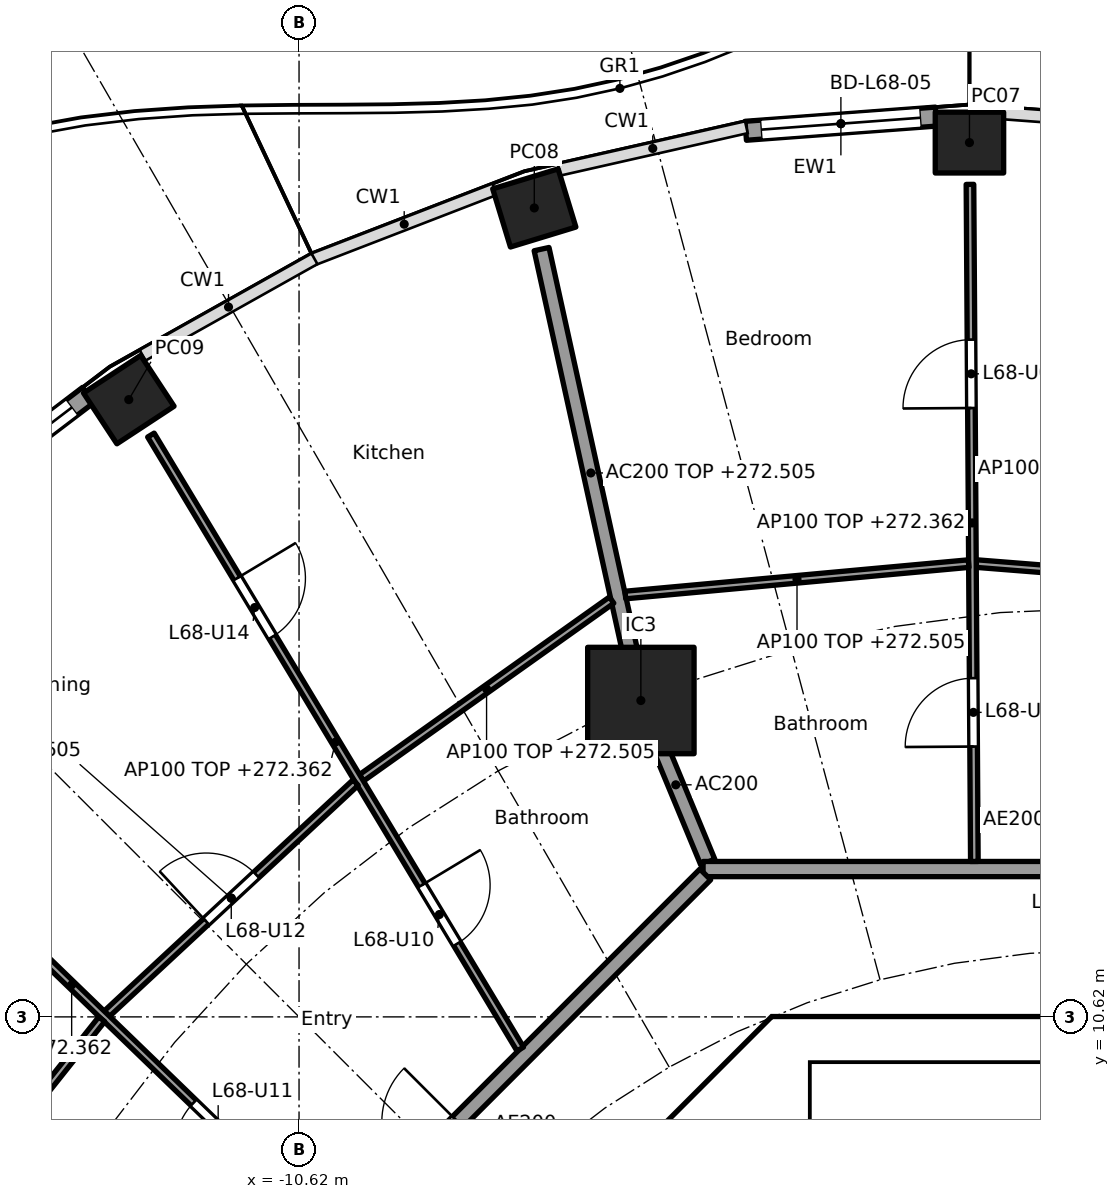
"""IFC4 building model, lengths in metres.
Left out: names, types, materials, properties, quantities, classifications, styles, units other than length and angle.
Written with IfcOpenShell. Run it as: python <this file> out.ifc"""

import sys

from ifc_helpers import new_model, si_unit, direction, frame, frame_2d, origin, origin_2d, place, context, subcontext, project, spatial, polyline, rectangle, hollow_rectangle, outline, extrude, element, fill, save


model = new_model("IFC4")
c1 = context("Model", 3, precision=1e-05, world=origin(), true_north=direction((0.0, 1.0)))
c2 = subcontext(c1, "Body", "Model", "MODEL_VIEW")
j1 = project(units=[si_unit("LENGTHUNIT", "METRE"), si_unit("PLANEANGLEUNIT", "RADIAN")], contexts=[c1])
p1 = place(None, origin())
s1 = spatial("IfcSite", under=j1, at=p1, CompositionType="ELEMENT")
p2 = place(p1, origin())
s2 = spatial("IfcBuilding", under=s1, at=p2, CompositionType="ELEMENT")
p3 = place(p2, frame((0.0, 0.0, 269.6)))
s3 = spatial("IfcBuildingStorey", under=s2, at=p3, CompositionType="ELEMENT", Elevation=269.6)
for number, where, z_axis, x_axis in (
    (1, (-1.8, 22.122, 0.0), (0.0, 0.0, 1.0), (-1.0, 0.0, 0.0)),
    (2, (-7.525, 21.262, 0.0), (0.0, 0.0, 1.0), (-0.957, -0.292, 0.0)),
    (3, (-12.86, 18.741, 0.0), (0.0, 0.0, 1.0), (-0.836, -0.549, 0.0)),
):
    element("IfcColumn", number, at=place(p3, frame(where, z_axis=z_axis, x_axis=x_axis)), inside=s3, PredefinedType="COLUMN", context=c2, shape_type="SweptSolid", body=[
        extrude(hollow_rectangle(XDim=0.9, YDim=0.8, WallThickness=0.028, at=origin_2d()), origin(), (0.0, 0.0, 1.0), 3.7),
    ])
p4 = place(p3, frame((-6.123, 14.782, 0.0), z_axis=(0.0, 0.0, 1.0), x_axis=(1.0, 0.0, 0.0)))
e4 = element("IfcColumn", 4, at=p4, inside=s3, PredefinedType="COLUMN", context=c2, shape_type="SweptSolid", body=[
    extrude(rectangle(XDim=1.4, YDim=1.4, at=origin_2d()), origin(), (0.0, 0.0, 1.0), 3.7),
])
p5 = place(p3, frame((-4.743, 22.277, 0.0), z_axis=(0.0, 0.0, 1.0), x_axis=(0.99722914645, 0.074391057731, 0.0)))
e5 = element("IfcWall", 5, at=p5, inside=s3, PredefinedType="SOLIDWALL", context=c2, shape_type="SweptSolid", body=[
    extrude(rectangle(XDim=2.51, YDim=0.25, at=frame_2d((1.255, 0.0))), origin(), (0.0, 0.0, 1.0), 3.44),
])
p6 = place(p5, frame((0.205, 0.0, 0.0)))
e6 = element("IfcOpeningElement", 6, at=p6, cuts=e5, PredefinedType="OPENING", context=c2, shape_type="SweptSolid", body=[
    extrude(rectangle(XDim=2.1, YDim=2.4, at=frame_2d((1.05, 1.2))), frame((0.0, 0.135, 0.0), z_axis=(0.0, -1.0, 0.0), x_axis=(1.0, 0.0, 0.0)), (0.0, 0.0, 1.0), 0.27),
])
p7 = place(p3, frame((-15.495, 17.204, 0.0), z_axis=(0.0, 0.0, 1.0), x_axis=(0.796010739377, 0.605282498339, 0.0)))
e7 = element("IfcWall", 7, at=p7, inside=s3, PredefinedType="SOLIDWALL", context=c2, shape_type="SweptSolid", body=[
    extrude(rectangle(XDim=2.641, YDim=0.25, at=frame_2d((1.32, 0.0))), origin(), (0.0, 0.0, 1.0), 3.44),
])
p8 = place(p7, frame((0.27, 0.0, 0.0)))
e8 = element("IfcOpeningElement", 8, at=p8, cuts=e7, PredefinedType="OPENING", context=c2, shape_type="SweptSolid", body=[
    extrude(rectangle(XDim=2.1, YDim=2.4, at=frame_2d((1.05, 1.2))), frame((0.0, 0.135, 0.0), z_axis=(0.0, -1.0, 0.0), x_axis=(1.0, 0.0, 0.0)), (0.0, 0.0, 1.0), 0.27),
])
p9 = place(p3, frame((-4.613, 9.988, 0.0), z_axis=(0.0, 0.0, 1.0), x_axis=(-0.707106781187, -0.707106781187, 0.0)))
e9 = element("IfcWall", 9, at=p9, inside=s3, PredefinedType="SHEAR", context=c2, shape_type="SweptSolid", body=[
    extrude(rectangle(XDim=7.602, YDim=0.6, at=frame_2d((3.801, 0.0))), origin(), (0.0, 0.0, 1.0), 3.44),
])
p10 = place(p9, frame((0.351, 0.0, 0.0)))
e10 = element("IfcOpeningElement", 10, at=p10, cuts=e9, PredefinedType="OPENING", context=c2, shape_type="SweptSolid", body=[
    extrude(rectangle(XDim=1.1, YDim=2.1, at=frame_2d((0.55, 1.05))), frame((0.0, 0.31, 0.0), z_axis=(0.0, -1.0, 0.0), x_axis=(1.0, 0.0, 0.0)), (0.0, 0.0, 1.0), 0.62),
])
p11 = place(p3, origin())
e11 = element("IfcWall", 11, at=p11, inside=s3, PredefinedType="SHEAR", context=c2, shape_type="SweptSolid", body=[
    extrude(outline(polyline([(-4.152, 10.025), (-4.401, 9.776), (-4.825, 10.2), (-4.401, 10.625), (4.401, 10.625), (4.825, 10.2), (4.401, 9.776), (4.152, 10.025), (-4.152, 10.025)])), origin(), (0.0, 0.0, 1.0), 3.44),
])
p12 = place(p3, origin())
e12 = element("IfcWall", 12, at=p12, inside=s3, PredefinedType="SOLIDWALL", context=c2, shape_type="SweptSolid", body=[
    extrude(outline(polyline([(-3.9, 7.025), (-4.1, 7.025), (-4.1, 10.025), (-3.9, 10.025), (-3.9, 7.025)])), origin(), (0.0, 0.0, 1.0), 3.44),
])
p13 = place(p3, frame((-5.243, 12.657, 0.0), z_axis=(0.0, 0.0, 1.0), x_axis=(-0.38273085373, 0.923859888513, 0.0)))
e13 = element("IfcWall", 13, at=p13, inside=s3, PredefinedType="PARTITIONING", context=c2, shape_type="SweptSolid", body=[
    extrude(rectangle(XDim=2.199, YDim=0.2, at=frame_2d((1.1, 0.0))), origin(), (0.0, 0.0, 1.0), 3.44),
])
p14 = place(p3, frame((-6.134, 14.831, 0.0), z_axis=(0.0, 0.0, 1.0), x_axis=(-0.214842475666, 0.976648714047, 0.0)))
e14 = element("IfcWall", 14, at=p14, inside=s3, PredefinedType="PARTITIONING", context=c2, shape_type="SweptSolid", body=[
    extrude(rectangle(XDim=6.031, YDim=0.2, at=frame_2d((3.015, 0.0))), origin(), (0.0, 0.0, 1.0), 2.905),
])
p15 = place(p3, frame((5.104, 12.565, 0.0), z_axis=(0.0, 0.0, 1.0), x_axis=(-1.0, 0.0, 0.0)))
e15 = element("IfcWall", 15, at=p15, inside=s3, PredefinedType="PARTITIONING", context=c2, shape_type="SweptSolid", body=[
    extrude(rectangle(XDim=10.409, YDim=0.2, at=frame_2d((5.205, 0.0))), origin(), (0.0, 0.0, 1.0), 3.44),
])
p16 = place(p15, frame((4.604, 0.0, 0.0)))
e16 = element("IfcOpeningElement", 16, at=p16, cuts=e15, PredefinedType="OPENING", context=c2, shape_type="SweptSolid", body=[
    extrude(rectangle(XDim=1.0, YDim=2.1, at=frame_2d((0.5, 1.05))), frame((0.0, 0.11, 0.0), z_axis=(0.0, -1.0, 0.0), x_axis=(1.0, 0.0, 0.0)), (0.0, 0.0, 1.0), 0.22),
])
p17 = place(p3, frame((-5.275, 12.494, 0.0), z_axis=(0.0, 0.0, 1.0), x_axis=(-0.707106781187, -0.707106781187, 0.0)))
e17 = element("IfcWall", 17, at=p17, inside=s3, PredefinedType="PARTITIONING", context=c2, shape_type="SweptSolid", body=[
    extrude(rectangle(XDim=10.209, YDim=0.2, at=frame_2d((5.104, 0.0))), origin(), (0.0, 0.0, 1.0), 3.44),
])
p18 = place(p17, frame((4.604, 0.0, 0.0)))
e18 = element("IfcOpeningElement", 18, at=p18, cuts=e17, PredefinedType="OPENING", context=c2, shape_type="SweptSolid", body=[
    extrude(rectangle(XDim=1.0, YDim=2.1, at=frame_2d((0.5, 1.05))), frame((0.0, 0.11, 0.0), z_axis=(0.0, -1.0, 0.0), x_axis=(1.0, 0.0, 0.0)), (0.0, 0.0, 1.0), 0.22),
])
p19 = place(p3, frame((2.713, 16.233, 0.0), z_axis=(0.0, 0.0, 1.0), x_axis=(-0.996870142942, 0.079056423588, 0.0)))
e19 = element("IfcWall", 19, at=p19, inside=s3, PredefinedType="PARTITIONING", context=c2, shape_type="SweptSolid", body=[
    extrude(rectangle(XDim=4.438, YDim=0.1, at=frame_2d((2.219, 0.0))), origin(), (0.0, 0.0, 1.0), 2.905),
])
p20 = place(p19, frame((1.794, 0.0, 0.0)))
e20 = element("IfcOpeningElement", 20, at=p20, cuts=e19, PredefinedType="OPENING", context=c2, shape_type="SweptSolid", body=[
    extrude(rectangle(XDim=0.9, YDim=2.1, at=frame_2d((0.45, 1.05))), frame((0.0, 0.06, 0.0), z_axis=(0.0, -1.0, 0.0), x_axis=(1.0, 0.0, 0.0)), (0.0, 0.0, 1.0), 0.12),
])
p21 = place(p3, frame((-1.736, 12.665, 0.0), z_axis=(0.0, 0.0, 1.0), x_axis=(-0.00646827636, 0.999979080482, 0.0)))
e21 = element("IfcWall", 21, at=p21, inside=s3, PredefinedType="PARTITIONING", context=c2, shape_type="SweptSolid", body=[
    extrude(rectangle(XDim=8.908, YDim=0.1, at=frame_2d((4.454, 0.0))), origin(), (0.0, 0.0, 1.0), 2.762),
])
p22 = place(p21, frame((1.512, 0.0, 0.0)))
e22 = element("IfcOpeningElement", 22, at=p22, cuts=e21, PredefinedType="OPENING", context=c2, shape_type="SweptSolid", body=[
    extrude(rectangle(XDim=0.9, YDim=2.1, at=frame_2d((0.45, 1.05))), frame((0.0, 0.06, 0.0), z_axis=(0.0, -1.0, 0.0), x_axis=(1.0, 0.0, 0.0)), (0.0, 0.0, 1.0), 0.12),
])
p23 = place(p21, frame((5.965, 0.0, 0.0)))
e23 = element("IfcOpeningElement", 23, at=p23, cuts=e21, PredefinedType="OPENING", context=c2, shape_type="SweptSolid", body=[
    extrude(rectangle(XDim=0.9, YDim=2.1, at=frame_2d((0.45, 1.05))), frame((0.0, 0.06, 0.0), z_axis=(0.0, -1.0, 0.0), x_axis=(1.0, 0.0, 0.0)), (0.0, 0.0, 1.0), 0.12),
])
p24 = place(p3, frame((-1.811, 16.583, 0.0), z_axis=(0.0, 0.0, 1.0), x_axis=(-0.995842301034, -0.091093970555, 0.0)))
e24 = element("IfcWall", 24, at=p24, inside=s3, PredefinedType="PARTITIONING", context=c2, shape_type="SweptSolid", body=[
    extrude(rectangle(XDim=4.535, YDim=0.1, at=frame_2d((2.267, 0.0))), origin(), (0.0, 0.0, 1.0), 2.905),
])
p25 = place(p3, frame((-6.508, 16.103, 0.0), z_axis=(0.0, 0.0, 1.0), x_axis=(-0.815202203556, -0.579176456114, 0.0)))
e25 = element("IfcWall", 25, at=p25, inside=s3, PredefinedType="PARTITIONING", context=c2, shape_type="SweptSolid", body=[
    extrude(rectangle(XDim=4.036, YDim=0.1, at=frame_2d((2.018, 0.0))), origin(), (0.0, 0.0, 1.0), 2.905),
])
p26 = place(p3, frame((-7.709, 10.197, 0.0), z_axis=(0.0, 0.0, 1.0), x_axis=(-0.515516160663, 0.856879856278, 0.0)))
e26 = element("IfcWall", 26, at=p26, inside=s3, PredefinedType="PARTITIONING", context=c2, shape_type="SweptSolid", body=[
    extrude(rectangle(XDim=9.426, YDim=0.1, at=frame_2d((4.713, 0.0))), origin(), (0.0, 0.0, 1.0), 2.762),
])
p27 = place(p26, frame((1.615, 0.0, 0.0)))
e27 = element("IfcOpeningElement", 27, at=p27, cuts=e26, PredefinedType="OPENING", context=c2, shape_type="SweptSolid", body=[
    extrude(rectangle(XDim=0.9, YDim=2.1, at=frame_2d((0.45, 1.05))), frame((0.0, 0.06, 0.0), z_axis=(0.0, -1.0, 0.0), x_axis=(1.0, 0.0, 0.0)), (0.0, 0.0, 1.0), 0.12),
])
p28 = place(p26, frame((6.328, 0.0, 0.0)))
e28 = element("IfcOpeningElement", 28, at=p28, cuts=e26, PredefinedType="OPENING", context=c2, shape_type="SweptSolid", body=[
    extrude(rectangle(XDim=0.9, YDim=2.1, at=frame_2d((0.45, 1.05))), frame((0.0, 0.06, 0.0), z_axis=(0.0, -1.0, 0.0), x_axis=(1.0, 0.0, 0.0)), (0.0, 0.0, 1.0), 0.12),
])
p29 = place(p3, frame((-9.875, 13.702, 0.0), z_axis=(0.0, 0.0, 1.0), x_axis=(-0.732618266441, -0.680639754699, 0.0)))
e29 = element("IfcWall", 29, at=p29, inside=s3, PredefinedType="PARTITIONING", context=c2, shape_type="SweptSolid", body=[
    extrude(rectangle(XDim=4.467, YDim=0.1, at=frame_2d((2.233, 0.0))), origin(), (0.0, 0.0, 1.0), 2.905),
])
p30 = place(p29, frame((1.783, 0.0, 0.0)))
e30 = element("IfcOpeningElement", 30, at=p30, cuts=e29, PredefinedType="OPENING", context=c2, shape_type="SweptSolid", body=[
    extrude(rectangle(XDim=0.9, YDim=2.1, at=frame_2d((0.45, 1.05))), frame((0.0, 0.06, 0.0), z_axis=(0.0, -1.0, 0.0), x_axis=(1.0, 0.0, 0.0)), (0.0, 0.0, 1.0), 0.12),
])
p31 = place(p3, frame((-10.183, 7.727, 0.0), z_axis=(0.0, 0.0, 1.0), x_axis=(-0.719063433856, 0.694944442449, 0.0)))
e31 = element("IfcWall", 31, at=p31, inside=s3, PredefinedType="PARTITIONING", context=c2, shape_type="SweptSolid", body=[
    extrude(rectangle(XDim=9.535, YDim=0.1, at=frame_2d((4.768, 0.0))), origin(), (0.0, 0.0, 1.0), 2.762),
])
p32 = place(p31, frame((1.637, 0.0, 0.0)))
e32 = element("IfcOpeningElement", 32, at=p32, cuts=e31, PredefinedType="OPENING", context=c2, shape_type="SweptSolid", body=[
    extrude(rectangle(XDim=0.9, YDim=2.1, at=frame_2d((0.45, 1.05))), frame((0.0, 0.06, 0.0), z_axis=(0.0, -1.0, 0.0), x_axis=(1.0, 0.0, 0.0)), (0.0, 0.0, 1.0), 0.12),
])
p33 = place(p31, frame((6.405, 0.0, 0.0)))
e33 = element("IfcOpeningElement", 33, at=p33, cuts=e31, PredefinedType="OPENING", context=c2, shape_type="SweptSolid", body=[
    extrude(rectangle(XDim=0.9, YDim=2.1, at=frame_2d((0.45, 1.05))), frame((0.0, 0.06, 0.0), z_axis=(0.0, -1.0, 0.0), x_axis=(1.0, 0.0, 0.0)), (0.0, 0.0, 1.0), 0.12),
])
p34 = place(p3, frame((-13.216, 10.589, 0.0), z_axis=(0.0, 0.0, 1.0), x_axis=(-0.622251572882, -0.782817335045, 0.0)))
e34 = element("IfcWall", 34, at=p34, inside=s3, PredefinedType="PARTITIONING", context=c2, shape_type="SweptSolid", body=[
    extrude(rectangle(XDim=4.636, YDim=0.1, at=frame_2d((2.318, 0.0))), origin(), (0.0, 0.0, 1.0), 2.905),
])
p35 = place(p6, origin())
e35 = element("IfcDoor", 35, at=p35, inside=s3, OperationType="SLIDING_TO_LEFT", PredefinedType="DOOR", context=c2, shape_type="SweptSolid", body=[
    extrude(rectangle(XDim=2.1, YDim=2.4, at=frame_2d((1.05, 1.2))), frame((0.0, 0.025, 0.0), z_axis=(0.0, -1.0, 0.0), x_axis=(1.0, 0.0, 0.0)), (0.0, 0.0, 1.0), 0.05),
])
fill(e6, e35)
p36 = place(p8, origin())
e36 = element("IfcDoor", 36, at=p36, inside=s3, OperationType="SLIDING_TO_LEFT", PredefinedType="DOOR", context=c2, shape_type="SweptSolid", body=[
    extrude(rectangle(XDim=2.1, YDim=2.4, at=frame_2d((1.05, 1.2))), frame((0.0, 0.025, 0.0), z_axis=(0.0, -1.0, 0.0), x_axis=(1.0, 0.0, 0.0)), (0.0, 0.0, 1.0), 0.05),
])
fill(e8, e36)
p37 = place(p10, origin())
e37 = element("IfcDoor", 37, at=p37, inside=s3, OperationType="SINGLE_SWING_RIGHT", PredefinedType="DOOR", context=c2, shape_type="SweptSolid", body=[
    extrude(rectangle(XDim=1.1, YDim=2.1, at=frame_2d((0.55, 1.05))), frame((0.0, 0.025, 0.0), z_axis=(0.0, -1.0, 0.0), x_axis=(1.0, 0.0, 0.0)), (0.0, 0.0, 1.0), 0.05),
])
fill(e10, e37)
p38 = place(p22, origin())
e38 = element("IfcDoor", 38, at=p38, inside=s3, OperationType="SINGLE_SWING_LEFT", PredefinedType="DOOR", context=c2, shape_type="SweptSolid", body=[
    extrude(rectangle(XDim=0.9, YDim=2.1, at=frame_2d((0.45, 1.05))), frame((0.0, 0.025, 0.0), z_axis=(0.0, -1.0, 0.0), x_axis=(1.0, 0.0, 0.0)), (0.0, 0.0, 1.0), 0.05),
])
fill(e22, e38)
p39 = place(p23, origin())
e39 = element("IfcDoor", 39, at=p39, inside=s3, OperationType="SINGLE_SWING_LEFT", PredefinedType="DOOR", context=c2, shape_type="SweptSolid", body=[
    extrude(rectangle(XDim=0.9, YDim=2.1, at=frame_2d((0.45, 1.05))), frame((0.0, 0.025, 0.0), z_axis=(0.0, -1.0, 0.0), x_axis=(1.0, 0.0, 0.0)), (0.0, 0.0, 1.0), 0.05),
])
fill(e23, e39)
p40 = place(p27, frame((0.9, 0.0, 0.0), x_axis=(-1.0, 0.0, 0.0)))
e40 = element("IfcDoor", 40, at=p40, inside=s3, OperationType="SINGLE_SWING_LEFT", PredefinedType="DOOR", context=c2, shape_type="SweptSolid", body=[
    extrude(rectangle(XDim=0.9, YDim=2.1, at=frame_2d((0.45, 1.05))), frame((0.0, 0.025, 0.0), z_axis=(0.0, -1.0, 0.0), x_axis=(1.0, 0.0, 0.0)), (0.0, 0.0, 1.0), 0.05),
])
fill(e27, e40)
p41 = place(p32, origin())
e41 = element("IfcDoor", 41, at=p41, inside=s3, OperationType="SINGLE_SWING_LEFT", PredefinedType="DOOR", context=c2, shape_type="SweptSolid", body=[
    extrude(rectangle(XDim=0.9, YDim=2.1, at=frame_2d((0.45, 1.05))), frame((0.0, 0.025, 0.0), z_axis=(0.0, -1.0, 0.0), x_axis=(1.0, 0.0, 0.0)), (0.0, 0.0, 1.0), 0.05),
])
fill(e32, e41)
p42 = place(p30, frame((0.9, 0.0, 0.0), x_axis=(-1.0, 0.0, 0.0)))
e42 = element("IfcDoor", 42, at=p42, inside=s3, OperationType="SINGLE_SWING_LEFT", PredefinedType="DOOR", context=c2, shape_type="SweptSolid", body=[
    extrude(rectangle(XDim=0.9, YDim=2.1, at=frame_2d((0.45, 1.05))), frame((0.0, 0.025, 0.0), z_axis=(0.0, -1.0, 0.0), x_axis=(1.0, 0.0, 0.0)), (0.0, 0.0, 1.0), 0.05),
])
fill(e30, e42)
p43 = place(p28, frame((0.9, 0.0, 0.0), x_axis=(-1.0, 0.0, 0.0)))
e43 = element("IfcDoor", 43, at=p43, inside=s3, OperationType="SINGLE_SWING_LEFT", PredefinedType="DOOR", context=c2, shape_type="SweptSolid", body=[
    extrude(rectangle(XDim=0.9, YDim=2.1, at=frame_2d((0.45, 1.05))), frame((0.0, 0.025, 0.0), z_axis=(0.0, -1.0, 0.0), x_axis=(1.0, 0.0, 0.0)), (0.0, 0.0, 1.0), 0.05),
])
fill(e28, e43)
save(model, sys.argv[1])
